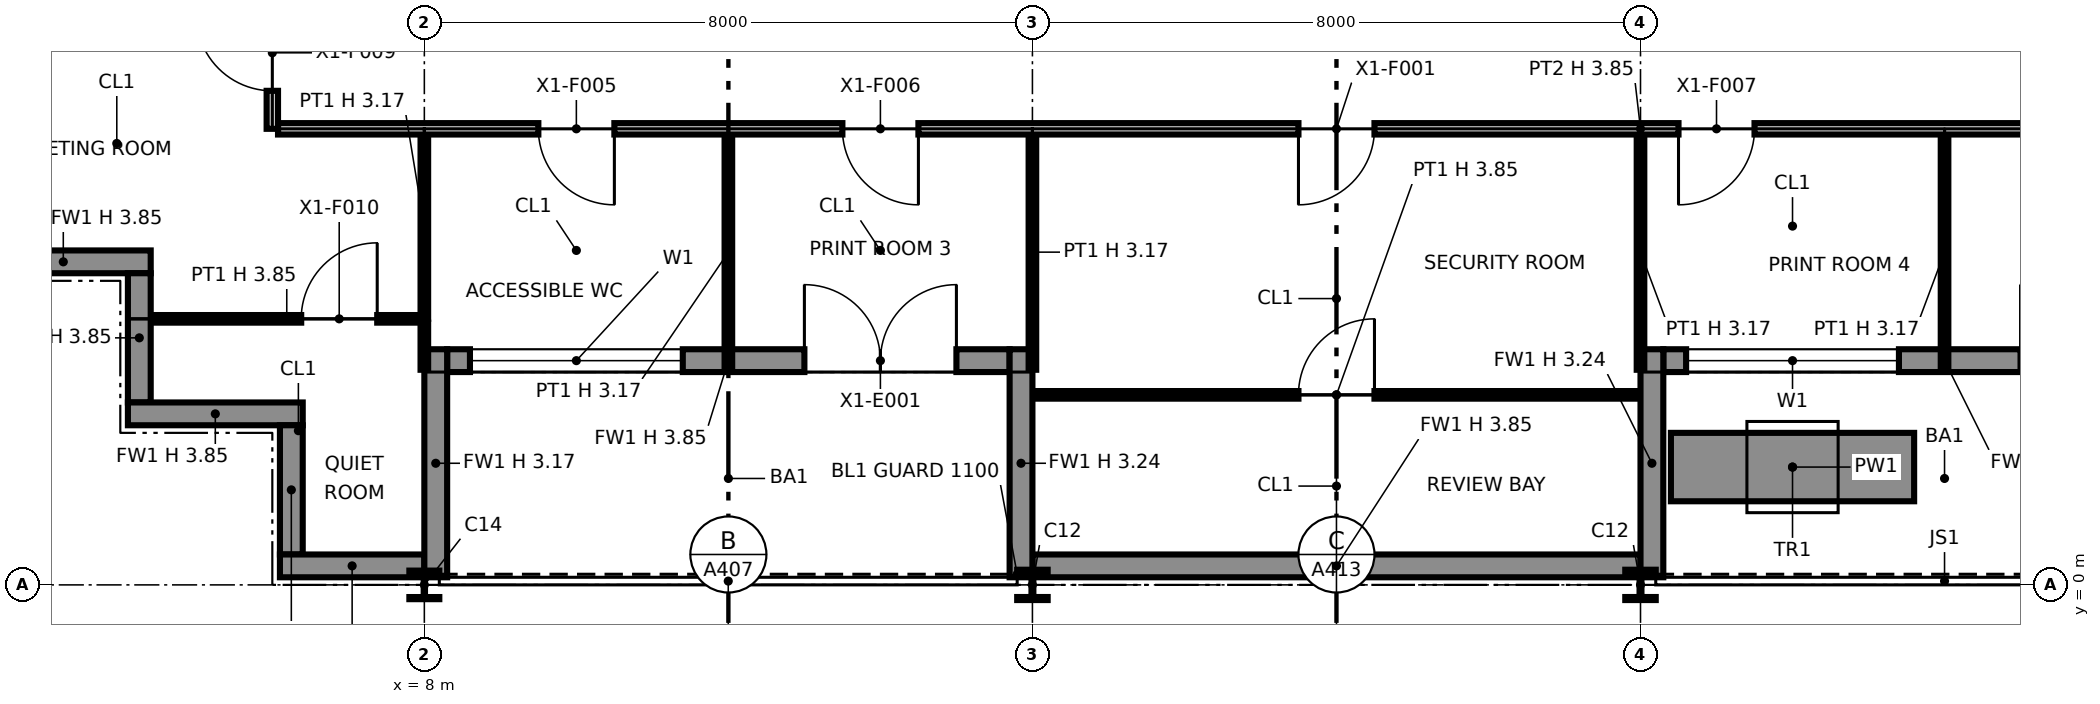
"""IFC4 building model, lengths in metres.
Left out: names, types, materials, properties, quantities, classifications, styles, units other than length and angle.
Written with IfcOpenShell. Run it as: python <this file> out.ifc"""

import sys

from ifc_helpers import new_model, si_unit, direction, frame, frame_2d, origin, origin_2d, place, context, subcontext, project, spatial, polyline, rectangle, i_section, outline, extrude, element, fill, save


model = new_model("IFC4")
c1 = context("Model", 3, precision=1e-05, world=origin(), true_north=direction((0.0, 1.0)))
c2 = subcontext(c1, "Body", "Model", "MODEL_VIEW")
j1 = project(units=[si_unit("LENGTHUNIT", "METRE"), si_unit("PLANEANGLEUNIT", "RADIAN")], contexts=[c1])
p1 = place(None, origin())
s1 = spatial("IfcSite", under=j1, at=p1, CompositionType="ELEMENT")
p2 = place(p1, origin())
s2 = spatial("IfcBuilding", under=s1, at=p2, CompositionType="ELEMENT")
p3 = place(p2, frame((0.0, 0.0, 255.0)))
s3 = spatial("IfcBuildingStorey", under=s2, at=p3, CompositionType="ELEMENT", Elevation=255.0)
p4 = place(p3, frame((8.0, 0.0, 0.0), z_axis=(0.0, 0.0, 1.0), x_axis=(1.0, 0.0, 0.0)))
e1 = element("IfcColumn", 1, at=p4, inside=s3, PredefinedType="COLUMN", context=c2, shape_type="SweptSolid", body=[
    extrude(i_section(OverallWidth=0.394, OverallDepth=0.376, WebThickness=0.017, FlangeThickness=0.028, at=origin_2d()), origin(), (0.0, 0.0, 1.0), 3.85),
])
for number, where, z_axis, x_axis in (
    (2, (16.0, 0.0, 0.0), (0.0, 0.0, 1.0), (1.0, 0.0, 0.0)),
    (3, (24.0, 0.0, 0.0), (0.0, 0.0, 1.0), (1.0, 0.0, 0.0)),
):
    element("IfcColumn", number, at=place(p3, frame(where, z_axis=z_axis, x_axis=x_axis)), inside=s3, PredefinedType="COLUMN", context=c2, shape_type="SweptSolid", body=[
        extrude(i_section(OverallWidth=0.401, OverallDepth=0.399, WebThickness=0.025, FlangeThickness=0.04, at=origin_2d()), origin(), (0.0, 0.0, 1.0), 3.85),
    ])
p5 = place(p3, frame((2.1, 4.25, 0.0), z_axis=(0.0, 0.0, 1.0), x_axis=(1.0, 0.0, 0.0)))
e4 = element("IfcWall", 4, at=p5, inside=s3, PredefinedType="SOLIDWALL", context=c2, shape_type="SweptSolid", body=[
    extrude(rectangle(XDim=2.3, YDim=0.3, at=frame_2d((1.15, 0.0))), origin(), (0.0, 0.0, 1.0), 3.85),
])
p6 = place(p3, frame((4.25, 4.1, 0.0), z_axis=(0.0, 0.0, 1.0), x_axis=(0.0, -1.0, 0.0)))
e5 = element("IfcWall", 5, at=p6, inside=s3, PredefinedType="SOLIDWALL", context=c2, shape_type="SweptSolid", body=[
    extrude(rectangle(XDim=1.7, YDim=0.3, at=frame_2d((0.85, 0.0))), origin(), (0.0, 0.0, 1.0), 3.85),
])
p7 = place(p3, frame((4.1, 2.25, 0.0), z_axis=(0.0, 0.0, 1.0), x_axis=(1.0, 0.0, 0.0)))
e6 = element("IfcWall", 6, at=p7, inside=s3, PredefinedType="SOLIDWALL", context=c2, shape_type="SweptSolid", body=[
    extrude(rectangle(XDim=2.3, YDim=0.3, at=frame_2d((1.15, 0.0))), origin(), (0.0, 0.0, 1.0), 3.85),
])
p8 = place(p3, frame((6.25, 2.1, 0.0), z_axis=(0.0, 0.0, 1.0), x_axis=(0.0, -1.0, 0.0)))
e7 = element("IfcWall", 7, at=p8, inside=s3, PredefinedType="SOLIDWALL", context=c2, shape_type="SweptSolid", body=[
    extrude(rectangle(XDim=1.7, YDim=0.3, at=frame_2d((0.85, 0.0))), origin(), (0.0, 0.0, 1.0), 3.85),
])
p9 = place(p3, frame((6.1, 0.25, 0.0), z_axis=(0.0, 0.0, 1.0), x_axis=(1.0, 0.0, 0.0)))
e8 = element("IfcWall", 8, at=p9, inside=s3, PredefinedType="SOLIDWALL", context=c2, shape_type="SweptSolid", body=[
    extrude(rectangle(XDim=1.9, YDim=0.3, at=frame_2d((0.95, 0.0))), origin(), (0.0, 0.0, 1.0), 3.85),
])
p10 = place(p3, frame((8.3, 2.95, 0.0), z_axis=(0.0, 0.0, 1.0), x_axis=(1.0, 0.0, 0.0)))
e9 = element("IfcWall", 9, at=p10, inside=s3, PredefinedType="SOLIDWALL", context=c2, shape_type="SweptSolid", body=[
    extrude(rectangle(XDim=7.4, YDim=0.3, at=frame_2d((3.7, 0.0))), origin(), (0.0, 0.0, 1.0), 3.85),
])
p11 = place(p10, frame((0.3, 0.0, 0.9)))
e10 = element("IfcOpeningElement", 10, at=p11, cuts=e9, PredefinedType="OPENING", context=c2, shape_type="SweptSolid", body=[
    extrude(rectangle(XDim=2.8, YDim=2.2, at=frame_2d((1.4, 1.1))), frame((0.0, 0.16, 0.0), z_axis=(0.0, -1.0, 0.0), x_axis=(1.0, 0.0, 0.0)), (0.0, 0.0, 1.0), 0.32),
])
p12 = place(p10, frame((4.7, 0.0, 0.0)))
e11 = element("IfcOpeningElement", 11, at=p12, cuts=e9, PredefinedType="OPENING", context=c2, shape_type="SweptSolid", body=[
    extrude(rectangle(XDim=2.0, YDim=2.4, at=frame_2d((1.0, 1.2))), frame((0.0, 0.16, 0.0), z_axis=(0.0, -1.0, 0.0), x_axis=(1.0, 0.0, 0.0)), (0.0, 0.0, 1.0), 0.32),
])
p13 = place(p3, frame((8.15, 0.1, 0.0), z_axis=(0.0, 0.0, 1.0), x_axis=(0.0, 1.0, 0.0)))
e12 = element("IfcWall", 12, at=p13, inside=s3, PredefinedType="SOLIDWALL", context=c2, shape_type="SweptSolid", body=[
    extrude(rectangle(XDim=3.0, YDim=0.3, at=frame_2d((1.5, 0.0))), origin(), (0.0, 0.0, 1.0), 3.171),
])
p14 = place(p3, frame((15.85, 0.1, 0.0), z_axis=(0.0, 0.0, 1.0), x_axis=(0.0, 1.0, 0.0)))
e13 = element("IfcWall", 13, at=p14, inside=s3, PredefinedType="SOLIDWALL", context=c2, shape_type="SweptSolid", body=[
    extrude(rectangle(XDim=3.0, YDim=0.3, at=frame_2d((1.5, 0.0))), origin(), (0.0, 0.0, 1.0), 3.237),
])
p15 = place(p3, frame((16.0, 0.25, 0.0), z_axis=(0.0, 0.0, 1.0), x_axis=(1.0, 0.0, 0.0)))
e14 = element("IfcWall", 14, at=p15, inside=s3, PredefinedType="SOLIDWALL", context=c2, shape_type="SweptSolid", body=[
    extrude(rectangle(XDim=8.0, YDim=0.3, at=frame_2d((4.0, 0.0))), origin(), (0.0, 0.0, 1.0), 3.85),
])
p16 = place(p3, frame((24.3, 2.95, 0.0), z_axis=(0.0, 0.0, 1.0), x_axis=(1.0, 0.0, 0.0)))
e15 = element("IfcWall", 15, at=p16, inside=s3, PredefinedType="SOLIDWALL", context=c2, shape_type="SweptSolid", body=[
    extrude(rectangle(XDim=7.4, YDim=0.3, at=frame_2d((3.7, 0.0))), origin(), (0.0, 0.0, 1.0), 3.85),
])
p17 = place(p16, frame((0.3, 0.0, 0.9)))
e16 = element("IfcOpeningElement", 16, at=p17, cuts=e15, PredefinedType="OPENING", context=c2, shape_type="SweptSolid", body=[
    extrude(rectangle(XDim=2.8, YDim=2.2, at=frame_2d((1.4, 1.1))), frame((0.0, 0.16, 0.0), z_axis=(0.0, -1.0, 0.0), x_axis=(1.0, 0.0, 0.0)), (0.0, 0.0, 1.0), 0.32),
])
p18 = place(p16, frame((4.7, 0.0, 0.0)))
e17 = element("IfcOpeningElement", 17, at=p18, cuts=e15, PredefinedType="OPENING", context=c2, shape_type="SweptSolid", body=[
    extrude(rectangle(XDim=2.0, YDim=2.4, at=frame_2d((1.0, 1.2))), frame((0.0, 0.16, 0.0), z_axis=(0.0, -1.0, 0.0), x_axis=(1.0, 0.0, 0.0)), (0.0, 0.0, 1.0), 0.32),
])
p19 = place(p3, frame((24.15, 0.1, 0.0), z_axis=(0.0, 0.0, 1.0), x_axis=(0.0, 1.0, 0.0)))
e18 = element("IfcWall", 18, at=p19, inside=s3, PredefinedType="SOLIDWALL", context=c2, shape_type="SweptSolid", body=[
    extrude(rectangle(XDim=3.0, YDim=0.3, at=frame_2d((1.5, 0.0))), origin(), (0.0, 0.0, 1.0), 3.237),
])
p20 = place(p3, frame((24.4, 1.55, 0.0), z_axis=(0.0, 0.0, 1.0), x_axis=(1.0, 0.0, 0.0)))
e19 = element("IfcWall", 19, at=p20, inside=s3, PredefinedType="SOLIDWALL", context=c2, shape_type="SweptSolid", body=[
    extrude(rectangle(XDim=3.2, YDim=0.9, at=frame_2d((1.6, 0.0))), origin(), (0.0, 0.0, 1.0), 0.6),
])
p21 = place(p3, frame((16.03, 2.5, 0.0), z_axis=(0.0, 0.0, 1.0), x_axis=(1.0, 0.0, 0.0)))
e20 = element("IfcWall", 20, at=p21, inside=s3, PredefinedType="PARTITIONING", context=c2, shape_type="SweptSolid", body=[
    extrude(rectangle(XDim=7.94, YDim=0.1, at=frame_2d((3.97, 0.0))), origin(), (0.0, 0.0, 1.0), 3.85),
])
p22 = place(p21, frame((3.47, 0.0, 0.0)))
e21 = element("IfcOpeningElement", 21, at=p22, cuts=e20, PredefinedType="OPENING", context=c2, shape_type="SweptSolid", body=[
    extrude(rectangle(XDim=1.0, YDim=2.1, at=frame_2d((0.5, 1.05))), frame((0.0, 0.06, 0.0), z_axis=(0.0, -1.0, 0.0), x_axis=(1.0, 0.0, 0.0)), (0.0, 0.0, 1.0), 0.12),
])
p23 = place(p3, frame((8.0, 2.83, 0.0), z_axis=(0.0, 0.0, 1.0), x_axis=(0.0, 1.0, 0.0)))
e22 = element("IfcWall", 22, at=p23, inside=s3, PredefinedType="PARTITIONING", context=c2, shape_type="SweptSolid", body=[
    extrude(rectangle(XDim=0.62, YDim=0.1, at=frame_2d((0.31, 0.0))), origin(), (0.0, 0.0, 1.0), 3.172),
])
for number, where, z_axis, x_axis in (
    (23, (12.0, 2.83, 0.0), (0.0, 0.0, 1.0), (0.0, 1.0, 0.0)),
    (24, (16.0, 2.83, 0.0), (0.0, 0.0, 1.0), (0.0, 1.0, 0.0)),
    (25, (24.0, 2.83, 0.0), (0.0, 0.0, 1.0), (0.0, 1.0, 0.0)),
    (26, (28.0, 2.83, 0.0), (0.0, 0.0, 1.0), (0.0, 1.0, 0.0)),
):
    element("IfcWall", number, at=place(p3, frame(where, z_axis=z_axis, x_axis=x_axis)), inside=s3, PredefinedType="PARTITIONING", context=c2, shape_type="SweptSolid", body=[
        extrude(rectangle(XDim=3.095, YDim=0.1, at=frame_2d((1.547, 0.0))), origin(), (0.0, 0.0, 1.0), 3.172),
    ])
p24 = place(p3, frame((4.43, 3.5, 0.0), z_axis=(0.0, 0.0, 1.0), x_axis=(1.0, 0.0, 0.0)))
e27 = element("IfcWall", 27, at=p24, inside=s3, PredefinedType="PARTITIONING", context=c2, shape_type="SweptSolid", body=[
    extrude(rectangle(XDim=3.52, YDim=0.1, at=frame_2d((1.76, 0.0))), origin(), (0.0, 0.0, 1.0), 3.85),
])
p25 = place(p24, frame((1.95, 0.0, 0.0)))
e28 = element("IfcOpeningElement", 28, at=p25, cuts=e27, PredefinedType="OPENING", context=c2, shape_type="SweptSolid", body=[
    extrude(rectangle(XDim=1.0, YDim=2.1, at=frame_2d((0.5, 1.05))), frame((0.0, 0.06, 0.0), z_axis=(0.0, -1.0, 0.0), x_axis=(1.0, 0.0, 0.0)), (0.0, 0.0, 1.0), 0.12),
])
p26 = place(p3, frame((8.0, 3.5, 0.0), z_axis=(0.0, 0.0, 1.0), x_axis=(0.0, 1.0, 0.0)))
e29 = element("IfcWall", 29, at=p26, inside=s3, PredefinedType="PARTITIONING", context=c2, shape_type="SweptSolid", body=[
    extrude(rectangle(XDim=2.425, YDim=0.1, at=frame_2d((1.212, 0.0))), origin(), (0.0, 0.0, 1.0), 3.172),
])
p27 = place(p3, frame((6.075, 6.0, 0.0), z_axis=(0.0, 0.0, 1.0), x_axis=(1.0, 0.0, 0.0)))
e30 = element("IfcWall", 30, at=p27, inside=s3, PredefinedType="PARTITIONING", context=c2, shape_type="SweptSolid", body=[
    extrude(rectangle(XDim=35.85, YDim=0.15, at=frame_2d((17.925, 0.0))), origin(), (0.0, 0.0, 1.0), 3.85),
])
p28 = place(p27, frame((14.425, 0.0, 0.0), z_axis=(0.0, 0.0, 1.0), x_axis=(-1.0, 0.0, 0.0)))
e31 = element("IfcOpeningElement", 31, at=p28, cuts=e30, PredefinedType="OPENING", context=c2, shape_type="SweptSolid", body=[
    extrude(rectangle(XDim=1.0, YDim=2.1, at=frame_2d((0.5, 1.05))), frame((0.0, 0.085, 0.0), z_axis=(0.0, -1.0, 0.0), x_axis=(1.0, 0.0, 0.0)), (0.0, 0.0, 1.0), 0.17),
])
p29 = place(p27, frame((30.425, 0.0, 0.0), z_axis=(0.0, 0.0, 1.0), x_axis=(-1.0, 0.0, 0.0)))
e32 = element("IfcOpeningElement", 32, at=p29, cuts=e30, PredefinedType="OPENING", context=c2, shape_type="SweptSolid", body=[
    extrude(rectangle(XDim=1.0, YDim=2.1, at=frame_2d((0.5, 1.05))), frame((0.0, 0.085, 0.0), z_axis=(0.0, -1.0, 0.0), x_axis=(1.0, 0.0, 0.0)), (0.0, 0.0, 1.0), 0.17),
])
p30 = place(p27, frame((4.425, 0.0, 0.0), z_axis=(0.0, 0.0, 1.0), x_axis=(-1.0, 0.0, 0.0)))
e33 = element("IfcOpeningElement", 33, at=p30, cuts=e30, PredefinedType="OPENING", context=c2, shape_type="SweptSolid", body=[
    extrude(rectangle(XDim=1.0, YDim=2.1, at=frame_2d((0.5, 1.05))), frame((0.0, 0.085, 0.0), z_axis=(0.0, -1.0, 0.0), x_axis=(1.0, 0.0, 0.0)), (0.0, 0.0, 1.0), 0.17),
])
p31 = place(p27, frame((8.425, 0.0, 0.0), z_axis=(0.0, 0.0, 1.0), x_axis=(-1.0, 0.0, 0.0)))
e34 = element("IfcOpeningElement", 34, at=p31, cuts=e30, PredefinedType="OPENING", context=c2, shape_type="SweptSolid", body=[
    extrude(rectangle(XDim=1.0, YDim=2.1, at=frame_2d((0.5, 1.05))), frame((0.0, 0.085, 0.0), z_axis=(0.0, -1.0, 0.0), x_axis=(1.0, 0.0, 0.0)), (0.0, 0.0, 1.0), 0.17),
])
p32 = place(p27, frame((19.425, 0.0, 0.0), z_axis=(0.0, 0.0, 1.0), x_axis=(-1.0, 0.0, 0.0)))
e35 = element("IfcOpeningElement", 35, at=p32, cuts=e30, PredefinedType="OPENING", context=c2, shape_type="SweptSolid", body=[
    extrude(rectangle(XDim=1.0, YDim=2.1, at=frame_2d((0.5, 1.05))), frame((0.0, 0.085, 0.0), z_axis=(0.0, -1.0, 0.0), x_axis=(1.0, 0.0, 0.0)), (0.0, 0.0, 1.0), 0.17),
])
p33 = place(p27, frame((24.425, 0.0, 0.0), z_axis=(0.0, 0.0, 1.0), x_axis=(-1.0, 0.0, 0.0)))
e36 = element("IfcOpeningElement", 36, at=p33, cuts=e30, PredefinedType="OPENING", context=c2, shape_type="SweptSolid", body=[
    extrude(rectangle(XDim=1.0, YDim=2.1, at=frame_2d((0.5, 1.05))), frame((0.0, 0.085, 0.0), z_axis=(0.0, -1.0, 0.0), x_axis=(1.0, 0.0, 0.0)), (0.0, 0.0, 1.0), 0.17),
])
p34 = place(p27, frame((35.425, 0.0, 0.0), z_axis=(0.0, 0.0, 1.0), x_axis=(-1.0, 0.0, 0.0)))
e37 = element("IfcOpeningElement", 37, at=p34, cuts=e30, PredefinedType="OPENING", context=c2, shape_type="SweptSolid", body=[
    extrude(rectangle(XDim=1.0, YDim=2.1, at=frame_2d((0.5, 1.05))), frame((0.0, 0.085, 0.0), z_axis=(0.0, -1.0, 0.0), x_axis=(1.0, 0.0, 0.0)), (0.0, 0.0, 1.0), 0.17),
])
p35 = place(p3, frame((6.0, 6.0, 0.0), z_axis=(0.0, 0.0, 1.0), x_axis=(0.0, 1.0, 0.0)))
e38 = element("IfcWall", 38, at=p35, inside=s3, PredefinedType="PARTITIONING", context=c2, shape_type="SweptSolid", body=[
    extrude(outline(polyline([(0.0, 0.0), (13.375, 0.0), (13.375, 3.85), (10.3, 3.85), (10.298, 3.172), (9.702, 3.172), (9.7, 3.85), (6.3, 3.85), (6.298, 3.172), (5.702, 3.172), (5.7, 3.85), (2.3, 3.85), (2.298, 3.172), (1.702, 3.172), (1.7, 3.85), (0.0, 3.85), (0.0, 0.0)])), frame((0.0, 0.075, 0.0), z_axis=(0.0, -1.0, 0.0), x_axis=(1.0, 0.0, 0.0)), (0.0, 0.0, 1.0), 0.15),
])
p36 = place(p35, frame((0.5, 0.0, 0.0)))
e39 = element("IfcOpeningElement", 39, at=p36, cuts=e38, PredefinedType="OPENING", context=c2, shape_type="SweptSolid", body=[
    extrude(rectangle(XDim=1.0, YDim=2.1, at=frame_2d((0.5, 1.05))), frame((0.0, 0.085, 0.0), z_axis=(0.0, -1.0, 0.0), x_axis=(1.0, 0.0, 0.0)), (0.0, 0.0, 1.0), 0.17),
])
p37 = place(p35, frame((3.5, 0.0, 0.0)))
e40 = element("IfcOpeningElement", 40, at=p37, cuts=e38, PredefinedType="OPENING", context=c2, shape_type="SweptSolid", body=[
    extrude(rectangle(XDim=1.0, YDim=2.1, at=frame_2d((0.5, 1.05))), frame((0.0, 0.085, 0.0), z_axis=(0.0, -1.0, 0.0), x_axis=(1.0, 0.0, 0.0)), (0.0, 0.0, 1.0), 0.17),
])
p38 = place(p35, frame((7.5, 0.0, 0.0)))
e41 = element("IfcOpeningElement", 41, at=p38, cuts=e38, PredefinedType="OPENING", context=c2, shape_type="SweptSolid", body=[
    extrude(rectangle(XDim=1.0, YDim=2.1, at=frame_2d((0.5, 1.05))), frame((0.0, 0.085, 0.0), z_axis=(0.0, -1.0, 0.0), x_axis=(1.0, 0.0, 0.0)), (0.0, 0.0, 1.0), 0.17),
])
p39 = place(p35, frame((11.225, 0.0, 0.0)))
e42 = element("IfcOpeningElement", 42, at=p39, cuts=e38, PredefinedType="OPENING", context=c2, shape_type="SweptSolid", body=[
    extrude(rectangle(XDim=1.0, YDim=2.1, at=frame_2d((0.5, 1.05))), frame((0.0, 0.085, 0.0), z_axis=(0.0, -1.0, 0.0), x_axis=(1.0, 0.0, 0.0)), (0.0, 0.0, 1.0), 0.17),
])
p40 = place(p11, origin())
e43 = element("IfcWindow", 43, at=p40, inside=s3, PartitioningType="SINGLE_PANEL", PredefinedType="WINDOW", context=c2, shape_type="SweptSolid", body=[
    extrude(rectangle(XDim=2.8, YDim=2.2, at=frame_2d((1.4, 1.1))), frame((0.0, 0.03, 0.0), z_axis=(0.0, -1.0, 0.0), x_axis=(1.0, 0.0, 0.0)), (0.0, 0.0, 1.0), 0.06),
])
fill(e10, e43)
p41 = place(p12, origin())
e44 = element("IfcDoor", 44, at=p41, inside=s3, OperationType="DOUBLE_DOOR_SINGLE_SWING", PredefinedType="DOOR", context=c2, shape_type="SweptSolid", body=[
    extrude(rectangle(XDim=2.0, YDim=2.4, at=frame_2d((1.0, 1.2))), frame((0.0, 0.025, 0.0), z_axis=(0.0, -1.0, 0.0), x_axis=(1.0, 0.0, 0.0)), (0.0, 0.0, 1.0), 0.05),
])
fill(e11, e44)
p42 = place(p17, origin())
e45 = element("IfcWindow", 45, at=p42, inside=s3, PartitioningType="SINGLE_PANEL", PredefinedType="WINDOW", context=c2, shape_type="SweptSolid", body=[
    extrude(rectangle(XDim=2.8, YDim=2.2, at=frame_2d((1.4, 1.1))), frame((0.0, 0.03, 0.0), z_axis=(0.0, -1.0, 0.0), x_axis=(1.0, 0.0, 0.0)), (0.0, 0.0, 1.0), 0.06),
])
fill(e16, e45)
p43 = place(p28, origin())
e46 = element("IfcDoor", 46, at=p43, inside=s3, OperationType="SINGLE_SWING_RIGHT", PredefinedType="DOOR", context=c2, shape_type="SweptSolid", body=[
    extrude(rectangle(XDim=1.0, YDim=2.1, at=frame_2d((0.5, 1.05))), frame((0.0, 0.025, 0.0), z_axis=(0.0, -1.0, 0.0), x_axis=(1.0, 0.0, 0.0)), (0.0, 0.0, 1.0), 0.05),
])
fill(e31, e46)
p44 = place(p22, origin())
e47 = element("IfcDoor", 47, at=p44, inside=s3, OperationType="SINGLE_SWING_RIGHT", PredefinedType="DOOR", context=c2, shape_type="SweptSolid", body=[
    extrude(rectangle(XDim=1.0, YDim=2.1, at=frame_2d((0.5, 1.05))), frame((0.0, 0.025, 0.0), z_axis=(0.0, -1.0, 0.0), x_axis=(1.0, 0.0, 0.0)), (0.0, 0.0, 1.0), 0.05),
])
fill(e21, e47)
p45 = place(p30, origin())
e48 = element("IfcDoor", 48, at=p45, inside=s3, OperationType="SINGLE_SWING_LEFT", PredefinedType="DOOR", context=c2, shape_type="SweptSolid", body=[
    extrude(rectangle(XDim=1.0, YDim=2.1, at=frame_2d((0.5, 1.05))), frame((0.0, 0.025, 0.0), z_axis=(0.0, -1.0, 0.0), x_axis=(1.0, 0.0, 0.0)), (0.0, 0.0, 1.0), 0.05),
])
fill(e33, e48)
p46 = place(p31, origin())
e49 = element("IfcDoor", 49, at=p46, inside=s3, OperationType="SINGLE_SWING_LEFT", PredefinedType="DOOR", context=c2, shape_type="SweptSolid", body=[
    extrude(rectangle(XDim=1.0, YDim=2.1, at=frame_2d((0.5, 1.05))), frame((0.0, 0.025, 0.0), z_axis=(0.0, -1.0, 0.0), x_axis=(1.0, 0.0, 0.0)), (0.0, 0.0, 1.0), 0.05),
])
fill(e34, e49)
p47 = place(p32, origin())
e50 = element("IfcDoor", 50, at=p47, inside=s3, OperationType="SINGLE_SWING_RIGHT", PredefinedType="DOOR", context=c2, shape_type="SweptSolid", body=[
    extrude(rectangle(XDim=1.0, YDim=2.1, at=frame_2d((0.5, 1.05))), frame((0.0, 0.025, 0.0), z_axis=(0.0, -1.0, 0.0), x_axis=(1.0, 0.0, 0.0)), (0.0, 0.0, 1.0), 0.05),
])
fill(e35, e50)
p48 = place(p36, origin())
e51 = element("IfcDoor", 51, at=p48, inside=s3, OperationType="SINGLE_SWING_RIGHT", PredefinedType="DOOR", context=c2, shape_type="SweptSolid", body=[
    extrude(rectangle(XDim=1.0, YDim=2.1, at=frame_2d((0.5, 1.05))), frame((0.0, 0.025, 0.0), z_axis=(0.0, -1.0, 0.0), x_axis=(1.0, 0.0, 0.0)), (0.0, 0.0, 1.0), 0.05),
])
fill(e39, e51)
p49 = place(p25, origin())
e52 = element("IfcDoor", 52, at=p49, inside=s3, OperationType="SINGLE_SWING_RIGHT", PredefinedType="DOOR", context=c2, shape_type="SweptSolid", body=[
    extrude(rectangle(XDim=1.0, YDim=2.1, at=frame_2d((0.5, 1.05))), frame((0.0, 0.025, 0.0), z_axis=(0.0, -1.0, 0.0), x_axis=(1.0, 0.0, 0.0)), (0.0, 0.0, 1.0), 0.05),
])
fill(e28, e52)
save(model, sys.argv[1])
